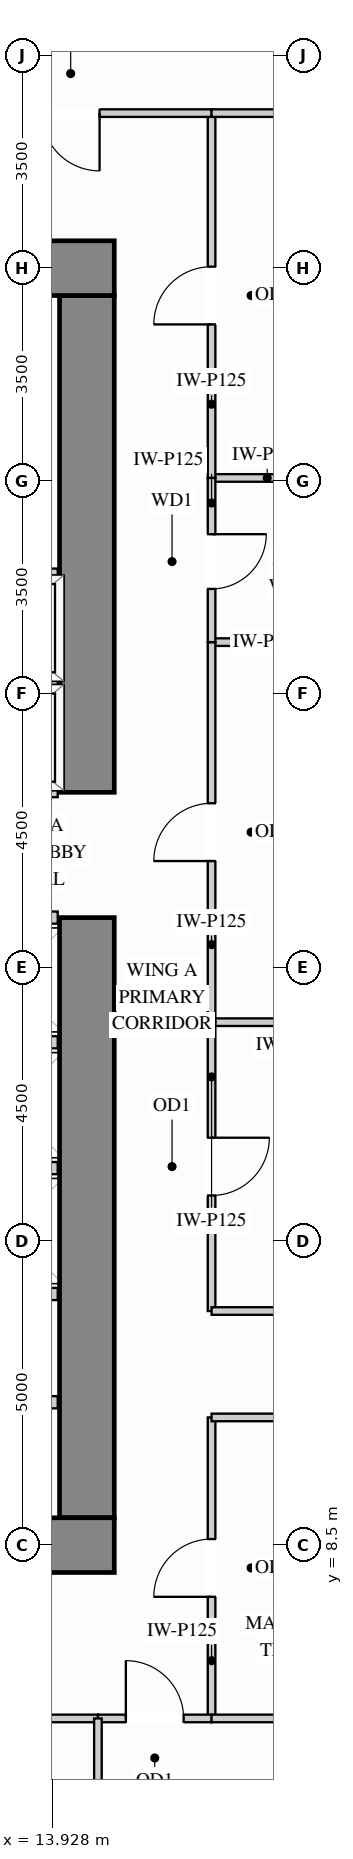
"""IFC4 building model, lengths in metres.
Left out: names, types, materials, properties, quantities, classifications, styles, units other than length and angle.
Written with IfcOpenShell. Run it as: python <this file> out.ifc"""

import sys

from ifc_helpers import new_model, si_unit, direction, frame, frame_2d, origin, place, context, subcontext, project, spatial, rectangle, extrude, source, transform, mapped, element, fill, save


model = new_model("IFC4")
c1 = context("Model", 3, precision=1e-05, world=origin(), true_north=direction((0.0, 1.0)))
c2 = subcontext(c1, "Body", "Model", "MODEL_VIEW")
j1 = project(units=[si_unit("LENGTHUNIT", "METRE"), si_unit("PLANEANGLEUNIT", "RADIAN")], contexts=[c1])
p1 = place(None, origin())
s1 = spatial("IfcSite", under=j1, at=p1, CompositionType="ELEMENT")
p2 = place(p1, origin())
s2 = spatial("IfcBuilding", under=s1, at=p2, CompositionType="ELEMENT")
p3 = place(p2, frame((0.0, 0.0, 58.5)))
s3 = spatial("IfcBuildingStorey", under=s2, at=p3, CompositionType="ELEMENT", Elevation=58.5)
m1 = source(origin(), c2, "Body", "SweptSolid", [
    extrude(rectangle(XDim=9.87, YDim=0.9, at=frame_2d((4.935, 0.0))), origin(), (0.0, 0.0, 1.0), 3.38),
])
p4 = place(p3, frame((14.5, 8.95, 0.0), z_axis=(0.0, 0.0, 1.0), x_axis=(0.0, 1.0, 0.0)))
e1 = element("IfcWall", 1, at=p4, inside=s3, PredefinedType="SHEAR", context=c2, shape_type="MappedRepresentation", body=[
    mapped(m1, transform((0.0, 0.0, 0.0), x_axis=(1.0, 0.0, 0.0), y_axis=(0.0, 1.0, 0.0), z_axis=(0.0, 0.0, 1.0))),
])
m2 = source(origin(), c2, "Body", "SweptSolid", [
    extrude(rectangle(XDim=8.17, YDim=0.9, at=frame_2d((4.085, 0.0))), origin(), (0.0, 0.0, 1.0), 3.38),
])
p5 = place(p3, frame((14.5, 20.88, 0.0), z_axis=(0.0, 0.0, 1.0), x_axis=(0.0, 1.0, 0.0)))
e2 = element("IfcWall", 2, at=p5, inside=s3, PredefinedType="SHEAR", context=c2, shape_type="MappedRepresentation", body=[
    mapped(m2, transform((0.0, 0.0, 0.0), x_axis=(1.0, 0.0, 0.0), y_axis=(0.0, 1.0, 0.0), z_axis=(0.0, 0.0, 1.0))),
])
m3 = source(origin(), c2, "Body", "SweptSolid", [
    extrude(rectangle(XDim=10.9, YDim=0.9, at=frame_2d((5.45, 0.0))), origin(), (0.0, 0.0, 1.0), 3.38),
])
for number, where, z_axis, x_axis in (
    (3, (4.05, 29.5, 0.0), (0.0, 0.0, 1.0), (1.0, 0.0, 0.0)),
    (4, (4.05, 8.5, 0.0), (0.0, 0.0, 1.0), (1.0, 0.0, 0.0)),
):
    element("IfcWall", number, at=place(p3, frame(where, z_axis=z_axis, x_axis=x_axis)), inside=s3, PredefinedType="SHEAR", context=c2, shape_type="MappedRepresentation", body=[
        mapped(m3, transform((0.0, 0.0, 0.0), x_axis=(1.0, 0.0, 0.0), y_axis=(0.0, 1.0, 0.0), z_axis=(0.0, 0.0, 1.0))),
    ])
m4 = source(origin(), c2, "Body", "SweptSolid", [
    extrude(rectangle(XDim=2.6, YDim=0.125, at=frame_2d((1.3, 0.0))), origin(), (0.0, 0.0, 1.0), 3.365),
])
p6 = place(p3, frame((16.55, 17.1, 0.0), z_axis=(0.0, 0.0, 1.0), x_axis=(1.0, 0.0, 0.0)))
e5 = element("IfcWall", 5, at=p6, inside=s3, PredefinedType="PARTITIONING", context=c2, shape_type="MappedRepresentation", body=[
    mapped(m4, transform((0.0, 0.0, 0.0), x_axis=(1.0, 0.0, 0.0), y_axis=(0.0, 1.0, 0.0), z_axis=(0.0, 0.0, 1.0))),
])
m5 = source(origin(), c2, "Body", "SweptSolid", [
    extrude(rectangle(XDim=2.598, YDim=0.125, at=frame_2d((1.299, 0.0))), origin(), (0.0, 0.0, 1.0), 3.365),
])
for number, where, z_axis, x_axis in (
    (6, (16.55, 23.35, 0.0), (0.0, 0.0, 1.0), (1.0, 0.0, 0.0)),
    (7, (16.55, 26.05, 0.0), (0.0, 0.0, 1.0), (1.0, 0.0, 0.0)),
):
    element("IfcWall", number, at=place(p3, frame(where, z_axis=z_axis, x_axis=x_axis)), inside=s3, PredefinedType="PARTITIONING", context=c2, shape_type="MappedRepresentation", body=[
        mapped(m5, transform((0.0, 0.0, 0.0), x_axis=(1.0, 0.0, 0.0), y_axis=(0.0, 1.0, 0.0), z_axis=(0.0, 0.0, 1.0))),
    ])
p7 = place(p3, frame((16.55, 12.35, 0.0), z_axis=(0.0, 0.0, 1.0), x_axis=(0.0, 1.0, 0.0)))
e8 = element("IfcWall", 8, at=p7, inside=s3, PredefinedType="PARTITIONING", context=c2, shape_type="SweptSolid", body=[
    extrude(rectangle(XDim=4.75, YDim=0.125, at=frame_2d((2.375, 0.0))), origin(), (0.0, 0.0, 1.0), 3.365),
])
p8 = place(p7, frame((1.9, 0.0, 0.0)))
e9 = element("IfcOpeningElement", 9, at=p8, cuts=e8, PredefinedType="OPENING", context=c2, shape_type="SweptSolid", body=[
    extrude(rectangle(XDim=0.95, YDim=2.15, at=frame_2d((0.475, 1.075))), frame((0.0, 0.073, 0.0), z_axis=(0.0, -1.0, 0.0), x_axis=(1.0, 0.0, 0.0)), (0.0, 0.0, 1.0), 0.145),
])
p9 = place(p3, frame((16.55, 17.1, 0.0), z_axis=(0.0, 0.0, 1.0), x_axis=(0.0, 1.0, 0.0)))
e10 = element("IfcWall", 10, at=p9, inside=s3, PredefinedType="PARTITIONING", context=c2, shape_type="SweptSolid", body=[
    extrude(rectangle(XDim=6.25, YDim=0.125, at=frame_2d((3.125, 0.0))), origin(), (0.0, 0.0, 1.0), 3.365),
])
p10 = place(p9, frame((2.65, 0.0, 0.0)))
e11 = element("IfcOpeningElement", 11, at=p10, cuts=e10, PredefinedType="OPENING", context=c2, shape_type="SweptSolid", body=[
    extrude(rectangle(XDim=0.95, YDim=2.15, at=frame_2d((0.475, 1.075))), frame((0.0, 0.073, 0.0), z_axis=(0.0, -1.0, 0.0), x_axis=(1.0, 0.0, 0.0)), (0.0, 0.0, 1.0), 0.145),
])
p11 = place(p3, frame((16.55, 26.05, 0.0), z_axis=(0.0, 0.0, 1.0), x_axis=(0.0, 1.0, 0.0)))
e12 = element("IfcWall", 12, at=p11, inside=s3, PredefinedType="PARTITIONING", context=c2, shape_type="SweptSolid", body=[
    extrude(rectangle(XDim=6.0, YDim=0.125, at=frame_2d((3.0, 0.0))), origin(), (0.0, 0.0, 1.0), 3.365),
])
p12 = place(p11, frame((2.525, 0.0, 0.0)))
e13 = element("IfcOpeningElement", 13, at=p12, cuts=e12, PredefinedType="OPENING", context=c2, shape_type="SweptSolid", body=[
    extrude(rectangle(XDim=0.95, YDim=2.15, at=frame_2d((0.475, 1.075))), frame((0.0, 0.073, 0.0), z_axis=(0.0, -1.0, 0.0), x_axis=(1.0, 0.0, 0.0)), (0.0, 0.0, 1.0), 0.145),
])
p13 = place(p3, frame((16.55, 5.65, 0.0), z_axis=(0.0, 0.0, 1.0), x_axis=(0.0, 1.0, 0.0)))
e14 = element("IfcWall", 14, at=p13, inside=s3, PredefinedType="PARTITIONING", context=c2, shape_type="SweptSolid", body=[
    extrude(rectangle(XDim=4.95, YDim=0.125, at=frame_2d((2.475, 0.0))), origin(), (0.0, 0.0, 1.0), 3.365),
])
p14 = place(p13, frame((2.0, 0.0, 0.0)))
e15 = element("IfcOpeningElement", 15, at=p14, cuts=e14, PredefinedType="OPENING", context=c2, shape_type="SweptSolid", body=[
    extrude(rectangle(XDim=0.95, YDim=2.15, at=frame_2d((0.475, 1.075))), frame((0.0, 0.073, 0.0), z_axis=(0.0, -1.0, 0.0), x_axis=(1.0, 0.0, 0.0)), (0.0, 0.0, 1.0), 0.145),
])
p15 = place(p3, frame((16.55, 23.35, 0.0), z_axis=(0.0, 0.0, 1.0), x_axis=(0.0, 1.0, 0.0)))
e16 = element("IfcWall", 16, at=p15, inside=s3, PredefinedType="PARTITIONING", context=c2, shape_type="SweptSolid", body=[
    extrude(rectangle(XDim=2.7, YDim=0.125, at=frame_2d((1.35, 0.0))), origin(), (0.0, 0.0, 1.0), 3.365),
])
p16 = place(p15, frame((0.875, 0.0, 0.0)))
e17 = element("IfcOpeningElement", 17, at=p16, cuts=e16, PredefinedType="OPENING", context=c2, shape_type="SweptSolid", body=[
    extrude(rectangle(XDim=0.9, YDim=2.15, at=frame_2d((0.45, 1.075))), frame((0.0, 0.073, 0.0), z_axis=(0.0, -1.0, 0.0), x_axis=(1.0, 0.0, 0.0)), (0.0, 0.0, 1.0), 0.145),
])
p17 = place(p3, frame((11.916, 32.05, 0.0), z_axis=(0.0, 0.0, 1.0), x_axis=(1.0, 0.0, 0.0)))
e18 = element("IfcWall", 18, at=p17, inside=s3, PredefinedType="PARTITIONING", context=c2, shape_type="SweptSolid", body=[
    extrude(rectangle(XDim=4.634, YDim=0.125, at=frame_2d((2.317, 0.0))), origin(), (0.0, 0.0, 1.0), 3.365),
])
p18 = place(p17, frame((1.842, 0.0, 0.0)))
e19 = element("IfcOpeningElement", 19, at=p18, cuts=e18, PredefinedType="OPENING", context=c2, shape_type="SweptSolid", body=[
    extrude(rectangle(XDim=0.95, YDim=2.15, at=frame_2d((0.475, 1.075))), frame((0.0, 0.073, 0.0), z_axis=(0.0, -1.0, 0.0), x_axis=(1.0, 0.0, 0.0)), (0.0, 0.0, 1.0), 0.145),
])
p19 = place(p3, frame((16.55, 32.05, 0.0), z_axis=(0.0, 0.0, 1.0), x_axis=(1.0, 0.0, 0.0)))
e20 = element("IfcWall", 20, at=p19, inside=s3, PredefinedType="PARTITIONING", context=c2, shape_type="MappedRepresentation", body=[
    mapped(m5, transform((0.0, 0.0, 0.0), x_axis=(1.0, 0.0, 0.0), y_axis=(0.0, 1.0, 0.0), z_axis=(0.0, 0.0, 1.0))),
])
m6 = source(origin(), c2, "Body", "SweptSolid", [
    extrude(rectangle(XDim=2.95, YDim=0.125, at=frame_2d((1.475, 0.0))), origin(), (0.0, 0.0, 1.0), 3.365),
])
for number, where, z_axis, x_axis in (
    (21, (16.55, 12.35, 0.0), (0.0, 0.0, 1.0), (1.0, 0.0, 0.0)),
    (22, (16.55, 10.6, 0.0), (0.0, 0.0, 1.0), (1.0, 0.0, 0.0)),
):
    element("IfcWall", number, at=place(p3, frame(where, z_axis=z_axis, x_axis=x_axis)), inside=s3, PredefinedType="PARTITIONING", context=c2, shape_type="MappedRepresentation", body=[
        mapped(m6, transform((0.0, 0.0, 0.0), x_axis=(1.0, 0.0, 0.0), y_axis=(0.0, 1.0, 0.0), z_axis=(0.0, 0.0, 1.0))),
    ])
p20 = place(p3, frame((9.22, 5.65, 0.0), z_axis=(0.0, 0.0, 1.0), x_axis=(1.0, 0.0, 0.0)))
e23 = element("IfcWall", 23, at=p20, inside=s3, PredefinedType="PARTITIONING", context=c2, shape_type="SweptSolid", body=[
    extrude(rectangle(XDim=5.461, YDim=0.125, at=frame_2d((2.73, 0.0))), origin(), (0.0, 0.0, 1.0), 3.365),
])
p21 = place(p20, frame((2.256, 0.0, 0.0)))
e24 = element("IfcOpeningElement", 24, at=p21, cuts=e23, PredefinedType="OPENING", context=c2, shape_type="SweptSolid", body=[
    extrude(rectangle(XDim=0.95, YDim=2.15, at=frame_2d((0.475, 1.075))), frame((0.0, 0.073, 0.0), z_axis=(0.0, -1.0, 0.0), x_axis=(1.0, 0.0, 0.0)), (0.0, 0.0, 1.0), 0.145),
])
p22 = place(p3, frame((14.681, 5.65, 0.0), z_axis=(0.0, 0.0, 1.0), x_axis=(1.0, 0.0, 0.0)))
e25 = element("IfcWall", 25, at=p22, inside=s3, PredefinedType="PARTITIONING", context=c2, shape_type="SweptSolid", body=[
    extrude(rectangle(XDim=1.869, YDim=0.125, at=frame_2d((0.935, 0.0))), origin(), (0.0, 0.0, 1.0), 3.365),
])
p23 = place(p22, frame((0.459, 0.0, 0.0)))
e26 = element("IfcOpeningElement", 26, at=p23, cuts=e25, PredefinedType="OPENING", context=c2, shape_type="SweptSolid", body=[
    extrude(rectangle(XDim=0.95, YDim=2.15, at=frame_2d((0.475, 1.075))), frame((0.0, 0.073, 0.0), z_axis=(0.0, -1.0, 0.0), x_axis=(1.0, 0.0, 0.0)), (0.0, 0.0, 1.0), 0.145),
])
p24 = place(p3, frame((16.55, 5.65, 0.0), z_axis=(0.0, 0.0, 1.0), x_axis=(1.0, 0.0, 0.0)))
e27 = element("IfcWall", 27, at=p24, inside=s3, PredefinedType="PARTITIONING", context=c2, shape_type="MappedRepresentation", body=[
    mapped(m5, transform((0.0, 0.0, 0.0), x_axis=(1.0, 0.0, 0.0), y_axis=(0.0, 1.0, 0.0), z_axis=(0.0, 0.0, 1.0))),
])
m7 = source(origin(), c2, "Body", "SweptSolid", [
    extrude(rectangle(XDim=4.39, YDim=0.125, at=frame_2d((2.195, 0.0))), origin(), (0.0, 0.0, 1.0), 3.365),
])
p25 = place(p3, frame((14.681, 1.26, 0.0), z_axis=(0.0, 0.0, 1.0), x_axis=(0.0, 1.0, 0.0)))
e28 = element("IfcWall", 28, at=p25, inside=s3, PredefinedType="PARTITIONING", context=c2, shape_type="MappedRepresentation", body=[
    mapped(m7, transform((0.0, 0.0, 0.0), x_axis=(1.0, 0.0, 0.0), y_axis=(0.0, 1.0, 0.0), z_axis=(0.0, 0.0, 1.0))),
])
m8 = source(origin(), c2, "Body", "SweptSolid", [
    extrude(rectangle(XDim=1.6, YDim=0.2, at=frame_2d((0.8, 0.0))), origin(), (0.0, 0.0, 1.0), 3.365),
])
p26 = place(p3, frame((12.42, 10.85, 0.0), z_axis=(0.0, 0.0, 1.0), x_axis=(1.0, 0.0, 0.0)))
e29 = element("IfcWall", 29, at=p26, inside=s3, PredefinedType="PARTITIONING", context=c2, shape_type="MappedRepresentation", body=[
    mapped(m8, transform((0.0, 0.0, 0.0), x_axis=(1.0, 0.0, 0.0), y_axis=(0.0, 1.0, 0.0), z_axis=(0.0, 0.0, 1.0))),
])
m9 = source(origin(), c2, "Body", "SweptSolid", [
    extrude(rectangle(XDim=2.19, YDim=0.2, at=frame_2d((1.095, 0.0))), origin(), (0.0, 0.0, 1.0), 3.365),
])
for number, where, z_axis, x_axis in (
    (30, (11.83, 22.66, 0.0), (0.0, 0.0, 1.0), (1.0, 0.0, 0.0)),
    (31, (11.83, 20.9, 0.0), (0.0, 0.0, 1.0), (1.0, 0.0, 0.0)),
    (32, (11.83, 24.46, 0.0), (0.0, 0.0, 1.0), (1.0, 0.0, 0.0)),
):
    element("IfcWall", number, at=place(p3, frame(where, z_axis=z_axis, x_axis=x_axis)), inside=s3, PredefinedType="PARTITIONING", context=c2, shape_type="MappedRepresentation", body=[
        mapped(m9, transform((0.0, 0.0, 0.0), x_axis=(1.0, 0.0, 0.0), y_axis=(0.0, 1.0, 0.0), z_axis=(0.0, 0.0, 1.0))),
    ])
m10 = source(origin(), c2, "Body", "SweptSolid", [
    extrude(rectangle(XDim=1.79, YDim=0.2, at=frame_2d((0.895, 0.0))), origin(), (0.0, 0.0, 1.0), 3.365),
])
for number, where, z_axis, x_axis in (
    (33, (12.23, 14.7, 0.0), (0.0, 0.0, 1.0), (1.0, 0.0, 0.0)),
    (34, (12.23, 12.63, 0.0), (0.0, 0.0, 1.0), (1.0, 0.0, 0.0)),
    (35, (12.23, 16.77, 0.0), (0.0, 0.0, 1.0), (1.0, 0.0, 0.0)),
    (36, (12.23, 18.82, 0.0), (0.0, 0.0, 1.0), (1.0, 0.0, 0.0)),
):
    element("IfcWall", number, at=place(p3, frame(where, z_axis=z_axis, x_axis=x_axis)), inside=s3, PredefinedType="PARTITIONING", context=c2, shape_type="MappedRepresentation", body=[
        mapped(m10, transform((0.0, 0.0, 0.0), x_axis=(1.0, 0.0, 0.0), y_axis=(0.0, 1.0, 0.0), z_axis=(0.0, 0.0, 1.0))),
    ])
m11 = source(origin(), c2, "Body", "SweptSolid", [
    extrude(rectangle(XDim=0.95, YDim=2.15, at=frame_2d((0.475, 1.075))), frame((0.0, 0.025, 0.0), z_axis=(0.0, -1.0, 0.0), x_axis=(1.0, 0.0, 0.0)), (0.0, 0.0, 1.0), 0.05),
])
p27 = place(p14, origin())
e37 = element("IfcDoor", 37, at=p27, inside=s3, OperationType="SINGLE_SWING_LEFT", PredefinedType="DOOR", context=c2, shape_type="MappedRepresentation", body=[
    mapped(m11, transform((0.0, 0.0, 0.0), x_axis=(1.0, 0.0, 0.0), y_axis=(0.0, 1.0, 0.0), z_axis=(0.0, 0.0, 1.0))),
])
fill(e15, e37)
p28 = place(p8, origin())
e38 = element("IfcDoor", 38, at=p28, inside=s3, OperationType="SINGLE_SWING_RIGHT", PredefinedType="DOOR", context=c2, shape_type="MappedRepresentation", body=[
    mapped(m11, transform((0.0, 0.0, 0.0), x_axis=(1.0, 0.0, 0.0), y_axis=(0.0, 1.0, 0.0), z_axis=(0.0, 0.0, 1.0))),
])
fill(e9, e38)
p29 = place(p10, origin())
e39 = element("IfcDoor", 39, at=p29, inside=s3, OperationType="SINGLE_SWING_LEFT", PredefinedType="DOOR", context=c2, shape_type="MappedRepresentation", body=[
    mapped(m11, transform((0.0, 0.0, 0.0), x_axis=(1.0, 0.0, 0.0), y_axis=(0.0, 1.0, 0.0), z_axis=(0.0, 0.0, 1.0))),
])
fill(e11, e39)
p30 = place(p12, origin())
e40 = element("IfcDoor", 40, at=p30, inside=s3, OperationType="SINGLE_SWING_LEFT", PredefinedType="DOOR", context=c2, shape_type="MappedRepresentation", body=[
    mapped(m11, transform((0.0, 0.0, 0.0), x_axis=(1.0, 0.0, 0.0), y_axis=(0.0, 1.0, 0.0), z_axis=(0.0, 0.0, 1.0))),
])
fill(e13, e40)
p31 = place(p18, origin())
e41 = element("IfcDoor", 41, at=p31, inside=s3, OperationType="SINGLE_SWING_RIGHT", PredefinedType="DOOR", context=c2, shape_type="MappedRepresentation", body=[
    mapped(m11, transform((0.0, 0.0, 0.0), x_axis=(1.0, 0.0, 0.0), y_axis=(0.0, 1.0, 0.0), z_axis=(0.0, 0.0, 1.0))),
])
fill(e19, e41)
p32 = place(p23, origin())
e42 = element("IfcDoor", 42, at=p32, inside=s3, OperationType="SINGLE_SWING_LEFT", PredefinedType="DOOR", context=c2, shape_type="MappedRepresentation", body=[
    mapped(m11, transform((0.0, 0.0, 0.0), x_axis=(1.0, 0.0, 0.0), y_axis=(0.0, 1.0, 0.0), z_axis=(0.0, 0.0, 1.0))),
])
fill(e26, e42)
m12 = source(origin(), c2, "Body", "SweptSolid", [
    extrude(rectangle(XDim=0.9, YDim=2.15, at=frame_2d((0.45, 1.075))), frame((0.0, 0.025, 0.0), z_axis=(0.0, -1.0, 0.0), x_axis=(1.0, 0.0, 0.0)), (0.0, 0.0, 1.0), 0.05),
])
p33 = place(p16, origin())
e43 = element("IfcDoor", 43, at=p33, inside=s3, OperationType="SINGLE_SWING_RIGHT", PredefinedType="DOOR", context=c2, shape_type="MappedRepresentation", body=[
    mapped(m12, transform((0.0, 0.0, 0.0), x_axis=(1.0, 0.0, 0.0), y_axis=(0.0, 1.0, 0.0), z_axis=(0.0, 0.0, 1.0))),
])
fill(e17, e43)
save(model, sys.argv[1])
